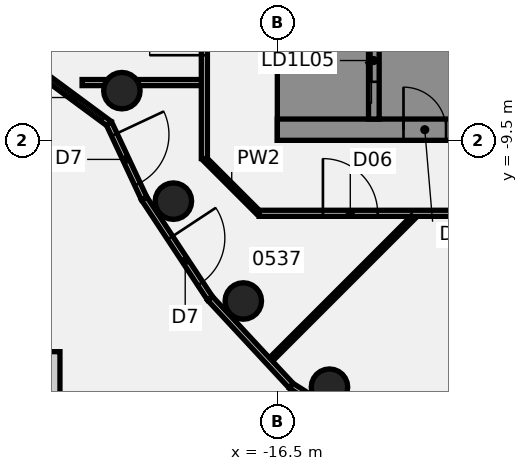
"""IFC4 building model, lengths in metres.
Left out: names, types, materials, properties, quantities, classifications, styles, units other than length and angle.
Written with IfcOpenShell. Run it as: python <this file> out.ifc"""

import sys

from ifc_helpers import new_model, si_unit, direction, frame, frame_2d, origin, origin_2d, place, context, subcontext, project, spatial, polyline, rectangle, circle, outline, extrude, element, fill, save


model = new_model("IFC4")
c1 = context("Model", 3, precision=1e-05, world=origin(), true_north=direction((0.0, 1.0)))
c2 = subcontext(c1, "Body", "Model", "MODEL_VIEW")
j1 = project(units=[si_unit("LENGTHUNIT", "METRE"), si_unit("PLANEANGLEUNIT", "RADIAN")], contexts=[c1])
p1 = place(None, origin())
s1 = spatial("IfcSite", under=j1, at=p1, CompositionType="ELEMENT")
p2 = place(p1, origin())
s2 = spatial("IfcBuilding", under=s1, at=p2, CompositionType="ELEMENT")
p3 = place(p2, frame((0.0, 0.0, 29.5)))
s3 = spatial("IfcBuildingStorey", under=s2, at=p3, CompositionType="ELEMENT", Elevation=29.5)
for number, where, z_axis, x_axis in (
    (1, (-21.613, -7.866, -0.6), (0.0, 0.0, 1.0), (1.0, 0.0, 0.0)),
    (2, (-19.919, -11.5, -0.6), (0.0, 0.0, 1.0), (1.0, 0.0, 0.0)),
    (3, (-17.619, -14.784, -0.6), (0.0, 0.0, 1.0), (1.0, 0.0, 0.0)),
    (4, (-14.784, -17.619, -0.6), (0.0, 0.0, 1.0), (1.0, 0.0, 0.0)),
):
    element("IfcColumn", number, at=place(p3, frame(where, z_axis=z_axis, x_axis=x_axis)), inside=s3, PredefinedType="COLUMN", context=c2, shape_type="SweptSolid", body=[
        extrude(circle(Radius=0.6, at=origin_2d()), origin(), (0.0, 0.0, 1.0), 4.96),
    ])
p4 = place(p3, frame((-18.865, -10.135, 0.0), z_axis=(0.0, 0.0, 1.0), x_axis=(0.707106781187, -0.707106781187, 0.0)))
e5 = element("IfcWall", 5, at=p4, inside=s3, PredefinedType="PARTITIONING", context=c2, shape_type="SweptSolid", body=[
    extrude(rectangle(XDim=2.445, YDim=0.15, at=frame_2d((1.223, 0.0))), origin(), (0.0, 0.0, 1.0), 3.76),
])
p5 = place(p3, frame((-22.922, -7.6, 0.0), z_axis=(0.0, 0.0, 1.0), x_axis=(1.0, 0.0, 0.0)))
e6 = element("IfcWall", 6, at=p5, inside=s3, PredefinedType="PARTITIONING", context=c2, shape_type="SweptSolid", body=[
    extrude(rectangle(XDim=0.77, YDim=0.2, at=frame_2d((0.385, 0.0))), origin(), (0.0, 0.0, 1.0), 3.76),
])
p6 = place(p3, frame((-21.074, -7.6, 0.0), z_axis=(0.0, 0.0, 1.0), x_axis=(1.0, 0.0, 0.0)))
e7 = element("IfcWall", 7, at=p6, inside=s3, PredefinedType="PARTITIONING", context=c2, shape_type="SweptSolid", body=[
    extrude(rectangle(XDim=2.089, YDim=0.2, at=frame_2d((1.044, 0.0))), origin(), (0.0, 0.0, 1.0), 3.76),
])
p7 = place(p3, frame((-17.1, -11.9, 0.0), z_axis=(0.0, 0.0, 1.0), x_axis=(1.0, 0.0, 0.0)))
e8 = element("IfcWall", 8, at=p7, inside=s3, PredefinedType="PARTITIONING", context=c2, shape_type="SweptSolid", body=[
    extrude(rectangle(XDim=34.165, YDim=0.2, at=frame_2d((17.083, 0.0))), origin(), (0.0, 0.0, 1.0), 3.76),
])
p8 = place(p7, frame((16.25, 0.0, 0.0)))
e9 = element("IfcOpeningElement", 9, at=p8, cuts=e8, PredefinedType="OPENING", context=c2, shape_type="SweptSolid", body=[
    extrude(rectangle(XDim=1.8, YDim=2.1, at=frame_2d((0.9, 1.05))), frame((0.0, 0.11, 0.0), z_axis=(0.0, -1.0, 0.0), x_axis=(1.0, 0.0, 0.0)), (0.0, 0.0, 1.0), 0.22),
])
p9 = place(p7, frame((2.1, 0.0, 0.0)))
e10 = element("IfcOpeningElement", 10, at=p9, cuts=e8, PredefinedType="OPENING", context=c2, shape_type="SweptSolid", body=[
    extrude(rectangle(XDim=1.8, YDim=2.1, at=frame_2d((0.9, 1.05))), frame((0.0, 0.11, 0.0), z_axis=(0.0, -1.0, 0.0), x_axis=(1.0, 0.0, 0.0)), (0.0, 0.0, 1.0), 0.22),
])
p10 = place(p7, frame((25.6, 0.0, 0.0)))
e11 = element("IfcOpeningElement", 11, at=p10, cuts=e8, PredefinedType="OPENING", context=c2, shape_type="SweptSolid", body=[
    extrude(rectangle(XDim=1.8, YDim=2.1, at=frame_2d((0.9, 1.05))), frame((0.0, 0.11, 0.0), z_axis=(0.0, -1.0, 0.0), x_axis=(1.0, 0.0, 0.0)), (0.0, 0.0, 1.0), 0.22),
])
p11 = place(p3, frame((-16.74, -16.74, 0.0), z_axis=(0.0, 0.0, 1.0), x_axis=(0.707106781187, 0.707106781187, 0.0)))
e12 = element("IfcWall", 12, at=p11, inside=s3, PredefinedType="PARTITIONING", context=c2, shape_type="SweptSolid", body=[
    extrude(rectangle(XDim=6.655, YDim=0.15, at=frame_2d((3.328, 0.0))), origin(), (0.0, 0.0, 1.0), 3.76),
])
p12 = place(p3, frame((-18.9, -10.1, 0.0), z_axis=(0.0, 0.0, 1.0), x_axis=(0.0, 1.0, 0.0)))
e13 = element("IfcWall", 13, at=p12, inside=s3, PredefinedType="PARTITIONING", context=c2, shape_type="SweptSolid", body=[
    extrude(rectangle(XDim=20.2, YDim=0.2, at=frame_2d((10.1, 0.0))), origin(), (0.0, 0.0, 1.0), 3.76),
])
p13 = place(p12, frame((10.0, 0.0, 0.0)))
e14 = element("IfcOpeningElement", 14, at=p13, cuts=e13, PredefinedType="OPENING", context=c2, shape_type="SweptSolid", body=[
    extrude(rectangle(XDim=1.8, YDim=2.1, at=frame_2d((0.9, 1.05))), frame((0.0, 0.11, 0.0), z_axis=(0.0, -1.0, 0.0), x_axis=(1.0, 0.0, 0.0)), (0.0, 0.0, 1.0), 0.22),
])
p14 = place(p12, frame((3.4, 0.0, 0.0)))
e15 = element("IfcOpeningElement", 15, at=p14, cuts=e13, PredefinedType="OPENING", context=c2, shape_type="SweptSolid", body=[
    extrude(rectangle(XDim=1.8, YDim=2.1, at=frame_2d((0.9, 1.05))), frame((0.0, 0.11, 0.0), z_axis=(0.0, -1.0, 0.0), x_axis=(1.0, 0.0, 0.0)), (0.0, 0.0, 1.0), 0.22),
])
p15 = place(p12, frame((15.0, 0.0, 0.0)))
e16 = element("IfcOpeningElement", 16, at=p15, cuts=e13, PredefinedType="OPENING", context=c2, shape_type="SweptSolid", body=[
    extrude(rectangle(XDim=1.8, YDim=2.1, at=frame_2d((0.9, 1.05))), frame((0.0, 0.11, 0.0), z_axis=(0.0, -1.0, 0.0), x_axis=(1.0, 0.0, 0.0)), (0.0, 0.0, 1.0), 0.22),
])
p16 = place(p3, frame((-23.825, -43.85, 0.0), z_axis=(0.0, 0.0, 1.0), x_axis=(0.0, 1.0, 0.0)))
e17 = element("IfcWall", 17, at=p16, inside=s3, PredefinedType="SOLIDWALL", context=c2, shape_type="SweptSolid", body=[
    extrude(rectangle(XDim=27.4, YDim=0.35, at=frame_2d((13.7, 0.0))), origin(), (0.0, 0.0, 1.0), 1.2),
])
p17 = place(p3, frame((-24.885, -6.844, 0.0), z_axis=(0.0, 0.0, 1.0), x_axis=(0.804392246617, -0.594098572278, 0.0)))
e18 = element("IfcWall", 18, at=p17, inside=s3, PredefinedType="SOLIDWALL", context=c2, shape_type="SweptSolid", body=[
    extrude(rectangle(XDim=3.544, YDim=0.2, at=frame_2d((1.772, 0.0))), origin(), (0.0, 0.0, 1.0), 4.36),
])
p18 = place(p17, frame((0.9, 0.0, 1.4)))
e19 = element("IfcOpeningElement", 19, at=p18, cuts=e18, PredefinedType="OPENING", context=c2, shape_type="SweptSolid", body=[
    extrude(rectangle(XDim=2.4, YDim=2.1, at=frame_2d((1.2, 1.05))), frame((0.0, 0.11, 0.0), z_axis=(0.0, -1.0, 0.0), x_axis=(1.0, 0.0, 0.0)), (0.0, 0.0, 1.0), 0.22),
])
p19 = place(p3, frame((-22.034, -8.95, 0.0), z_axis=(0.0, 0.0, 1.0), x_axis=(0.424181121769, -0.90557737159, 0.0)))
e20 = element("IfcWall", 20, at=p19, inside=s3, PredefinedType="SOLIDWALL", context=c2, shape_type="SweptSolid", body=[
    extrude(rectangle(XDim=2.722, YDim=0.2, at=frame_2d((1.361, 0.0))), origin(), (0.0, 0.0, 1.0), 4.36),
])
p20 = place(p19, frame((0.4, 0.0, 0.0)))
e21 = element("IfcOpeningElement", 21, at=p20, cuts=e20, PredefinedType="OPENING", context=c2, shape_type="SweptSolid", body=[
    extrude(rectangle(XDim=1.8, YDim=2.4, at=frame_2d((0.9, 1.2))), frame((0.0, 0.11, 0.0), z_axis=(0.0, -1.0, 0.0), x_axis=(1.0, 0.0, 0.0)), (0.0, 0.0, 1.0), 0.22),
])
p21 = place(p3, frame((-20.879, -11.416, 0.0), z_axis=(0.0, 0.0, 1.0), x_axis=(0.550579088084, -0.834783006394, 0.0)))
e22 = element("IfcWall", 22, at=p21, inside=s3, PredefinedType="SOLIDWALL", context=c2, shape_type="SweptSolid", body=[
    extrude(rectangle(XDim=3.93, YDim=0.2, at=frame_2d((1.965, 0.0))), origin(), (0.0, 0.0, 1.0), 4.36),
])
p22 = place(p21, frame((1.55, 0.0, 0.0)))
e23 = element("IfcOpeningElement", 23, at=p22, cuts=e22, PredefinedType="OPENING", context=c2, shape_type="SweptSolid", body=[
    extrude(rectangle(XDim=1.8, YDim=2.4, at=frame_2d((0.9, 1.2))), frame((0.0, 0.11, 0.0), z_axis=(0.0, -1.0, 0.0), x_axis=(1.0, 0.0, 0.0)), (0.0, 0.0, 1.0), 0.22),
])
p23 = place(p3, frame((-18.715, -14.696, 0.0), z_axis=(0.0, 0.0, 1.0), x_axis=(0.680405826691, -0.732835527935, 0.0)))
e24 = element("IfcWall", 24, at=p23, inside=s3, PredefinedType="SOLIDWALL", context=c2, shape_type="SweptSolid", body=[
    extrude(rectangle(XDim=3.93, YDim=0.2, at=frame_2d((1.965, 0.0))), origin(), (0.0, 0.0, 1.0), 4.36),
])
p24 = place(p3, frame((-16.041, -17.576, 0.0), z_axis=(0.0, 0.0, 1.0), x_axis=(0.847351322154, -0.531032707885, 0.0)))
e25 = element("IfcWall", 25, at=p24, inside=s3, PredefinedType="SOLIDWALL", context=c2, shape_type="SweptSolid", body=[
    extrude(rectangle(XDim=8.679, YDim=0.2, at=frame_2d((4.34, 0.0))), origin(), (0.0, 0.0, 1.0), 4.36),
])
p25 = place(p3, frame((-16.5, -9.15, 0.0), z_axis=(0.0, 0.0, 1.0), x_axis=(1.0, 0.0, 0.0)))
e26 = element("IfcWall", 26, at=p25, inside=s3, PredefinedType="SHEAR", context=c2, shape_type="SweptSolid", body=[
    extrude(rectangle(XDim=13.0, YDim=0.7, at=frame_2d((6.5, 0.0))), origin(), (0.0, 0.0, 1.0), 4.36),
])
p26 = place(p25, frame((4.15, 0.0, 0.0)))
e27 = element("IfcOpeningElement", 27, at=p26, cuts=e26, PredefinedType="OPENING", context=c2, shape_type="SweptSolid", body=[
    extrude(rectangle(XDim=1.4, YDim=2.1, at=frame_2d((0.7, 1.05))), frame((0.0, 0.36, 0.0), z_axis=(0.0, -1.0, 0.0), x_axis=(1.0, 0.0, 0.0)), (0.0, 0.0, 1.0), 0.72),
])
p27 = place(p25, frame((10.125, 0.0, 0.0)))
e28 = element("IfcOpeningElement", 28, at=p27, cuts=e26, PredefinedType="OPENING", context=c2, shape_type="SweptSolid", body=[
    extrude(rectangle(XDim=1.4, YDim=2.1, at=frame_2d((0.7, 1.05))), frame((0.0, 0.36, 0.0), z_axis=(0.0, -1.0, 0.0), x_axis=(1.0, 0.0, 0.0)), (0.0, 0.0, 1.0), 0.72),
])
p28 = place(p3, origin())
e29 = element("IfcWall", 29, at=p28, inside=s3, PredefinedType="SHEAR", context=c2, shape_type="SweptSolid", body=[
    extrude(outline(polyline([(-13.5, -8.8), (-13.5, -8.125), (-15.8, -8.125), (-15.8, -5.625), (-13.5, -5.625), (-13.5, -5.375), (-15.8, -5.375), (-15.8, -2.875), (-13.5, -2.875), (-13.5, -2.625), (-15.8, -2.625), (-15.8, -0.125), (-13.5, -0.125), (-13.5, 0.125), (-15.8, 0.125), (-15.8, 2.625), (-13.5, 2.625), (-13.5, 2.875), (-15.8, 2.875), (-15.8, 5.375), (-13.5, 5.375), (-13.5, 5.625), (-15.8, 5.625), (-15.8, 8.125), (-13.5, 8.125), (-13.5, 8.8), (-15.8, 8.8), (-16.5, 8.8), (-16.5, -8.8), (-15.8, -8.8), (-13.5, -8.8)])), origin(), (0.0, 0.0, 1.0), 4.36),
])
p29 = place(p3, frame((-13.325, -8.8, 0.0), z_axis=(0.0, 0.0, 1.0), x_axis=(0.0, 1.0, 0.0)))
e30 = element("IfcWall", 30, at=p29, inside=s3, PredefinedType="SHEAR", context=c2, shape_type="SweptSolid", body=[
    extrude(rectangle(XDim=17.6, YDim=0.35, at=frame_2d((8.8, 0.0))), origin(), (0.0, 0.0, 1.0), 4.36),
])
p30 = place(p29, frame((1.225, 0.0, 0.0)))
e31 = element("IfcOpeningElement", 31, at=p30, cuts=e30, PredefinedType="OPENING", context=c2, shape_type="SweptSolid", body=[
    extrude(rectangle(XDim=1.4, YDim=2.1, at=frame_2d((0.7, 1.05))), frame((0.0, 0.185, 0.0), z_axis=(0.0, -1.0, 0.0), x_axis=(1.0, 0.0, 0.0)), (0.0, 0.0, 1.0), 0.37),
])
p31 = place(p29, frame((4.125, 0.0, 0.0)))
e32 = element("IfcOpeningElement", 32, at=p31, cuts=e30, PredefinedType="OPENING", context=c2, shape_type="SweptSolid", body=[
    extrude(rectangle(XDim=1.1, YDim=2.1, at=frame_2d((0.55, 1.05))), frame((0.0, 0.185, 0.0), z_axis=(0.0, -1.0, 0.0), x_axis=(1.0, 0.0, 0.0)), (0.0, 0.0, 1.0), 0.37),
])
p32 = place(p29, frame((6.875, 0.0, 0.0)))
e33 = element("IfcOpeningElement", 33, at=p32, cuts=e30, PredefinedType="OPENING", context=c2, shape_type="SweptSolid", body=[
    extrude(rectangle(XDim=1.1, YDim=2.1, at=frame_2d((0.55, 1.05))), frame((0.0, 0.185, 0.0), z_axis=(0.0, -1.0, 0.0), x_axis=(1.0, 0.0, 0.0)), (0.0, 0.0, 1.0), 0.37),
])
p33 = place(p29, frame((9.625, 0.0, 0.0)))
e34 = element("IfcOpeningElement", 34, at=p33, cuts=e30, PredefinedType="OPENING", context=c2, shape_type="SweptSolid", body=[
    extrude(rectangle(XDim=1.1, YDim=2.1, at=frame_2d((0.55, 1.05))), frame((0.0, 0.185, 0.0), z_axis=(0.0, -1.0, 0.0), x_axis=(1.0, 0.0, 0.0)), (0.0, 0.0, 1.0), 0.37),
])
p34 = place(p29, frame((12.375, 0.0, 0.0)))
e35 = element("IfcOpeningElement", 35, at=p34, cuts=e30, PredefinedType="OPENING", context=c2, shape_type="SweptSolid", body=[
    extrude(rectangle(XDim=1.1, YDim=2.1, at=frame_2d((0.55, 1.05))), frame((0.0, 0.185, 0.0), z_axis=(0.0, -1.0, 0.0), x_axis=(1.0, 0.0, 0.0)), (0.0, 0.0, 1.0), 0.37),
])
p35 = place(p9, origin())
e36 = element("IfcDoor", 36, at=p35, inside=s3, OperationType="DOUBLE_DOOR_SINGLE_SWING", PredefinedType="DOOR", context=c2, shape_type="SweptSolid", body=[
    extrude(rectangle(XDim=1.8, YDim=2.1, at=frame_2d((0.9, 1.05))), frame((0.0, 0.025, 0.0), z_axis=(0.0, -1.0, 0.0), x_axis=(1.0, 0.0, 0.0)), (0.0, 0.0, 1.0), 0.05),
])
fill(e10, e36)
p36 = place(p14, origin())
e37 = element("IfcDoor", 37, at=p36, inside=s3, OperationType="DOUBLE_DOOR_SINGLE_SWING", PredefinedType="DOOR", context=c2, shape_type="SweptSolid", body=[
    extrude(rectangle(XDim=1.8, YDim=2.1, at=frame_2d((0.9, 1.05))), frame((0.0, 0.025, 0.0), z_axis=(0.0, -1.0, 0.0), x_axis=(1.0, 0.0, 0.0)), (0.0, 0.0, 1.0), 0.05),
])
fill(e15, e37)
p37 = place(p18, origin())
e38 = element("IfcWindow", 38, at=p37, inside=s3, PartitioningType="SINGLE_PANEL", PredefinedType="WINDOW", context=c2, shape_type="SweptSolid", body=[
    extrude(rectangle(XDim=2.4, YDim=2.1, at=frame_2d((1.2, 1.05))), frame((0.0, 0.03, 0.0), z_axis=(0.0, -1.0, 0.0), x_axis=(1.0, 0.0, 0.0)), (0.0, 0.0, 1.0), 0.06),
])
fill(e19, e38)
p38 = place(p22, frame((1.8, 0.0, 0.0), z_axis=(0.0, 0.0, 1.0), x_axis=(-1.0, 0.0, 0.0)))
e39 = element("IfcDoor", 39, at=p38, inside=s3, OperationType="DOUBLE_DOOR_SINGLE_SWING", PredefinedType="DOOR", context=c2, shape_type="SweptSolid", body=[
    extrude(rectangle(XDim=1.8, YDim=2.4, at=frame_2d((0.9, 1.2))), frame((0.0, 0.025, 0.0), z_axis=(0.0, -1.0, 0.0), x_axis=(1.0, 0.0, 0.0)), (0.0, 0.0, 1.0), 0.05),
])
fill(e23, e39)
p39 = place(p20, frame((1.8, 0.0, 0.0), z_axis=(0.0, 0.0, 1.0), x_axis=(-1.0, 0.0, 0.0)))
e40 = element("IfcDoor", 40, at=p39, inside=s3, OperationType="DOUBLE_DOOR_SINGLE_SWING", PredefinedType="DOOR", context=c2, shape_type="SweptSolid", body=[
    extrude(rectangle(XDim=1.8, YDim=2.4, at=frame_2d((0.9, 1.2))), frame((0.0, 0.025, 0.0), z_axis=(0.0, -1.0, 0.0), x_axis=(1.0, 0.0, 0.0)), (0.0, 0.0, 1.0), 0.05),
])
fill(e21, e40)
p40 = place(p26, origin())
e41 = element("IfcDoor", 41, at=p40, inside=s3, OperationType="SINGLE_SWING_LEFT", PredefinedType="DOOR", context=c2, shape_type="SweptSolid", body=[
    extrude(rectangle(XDim=1.4, YDim=2.1, at=frame_2d((0.7, 1.05))), frame((0.0, 0.025, 0.0), z_axis=(0.0, -1.0, 0.0), x_axis=(1.0, 0.0, 0.0)), (0.0, 0.0, 1.0), 0.05),
])
fill(e27, e41)
p41 = place(p30, origin())
e42 = element("IfcDoor", 42, at=p41, inside=s3, OperationType="SLIDING_TO_LEFT", PredefinedType="DOOR", context=c2, shape_type="SweptSolid", body=[
    extrude(rectangle(XDim=1.4, YDim=2.1, at=frame_2d((0.7, 1.05))), frame((0.0, 0.025, 0.0), z_axis=(0.0, -1.0, 0.0), x_axis=(1.0, 0.0, 0.0)), (0.0, 0.0, 1.0), 0.05),
])
fill(e31, e42)
save(model, sys.argv[1])
